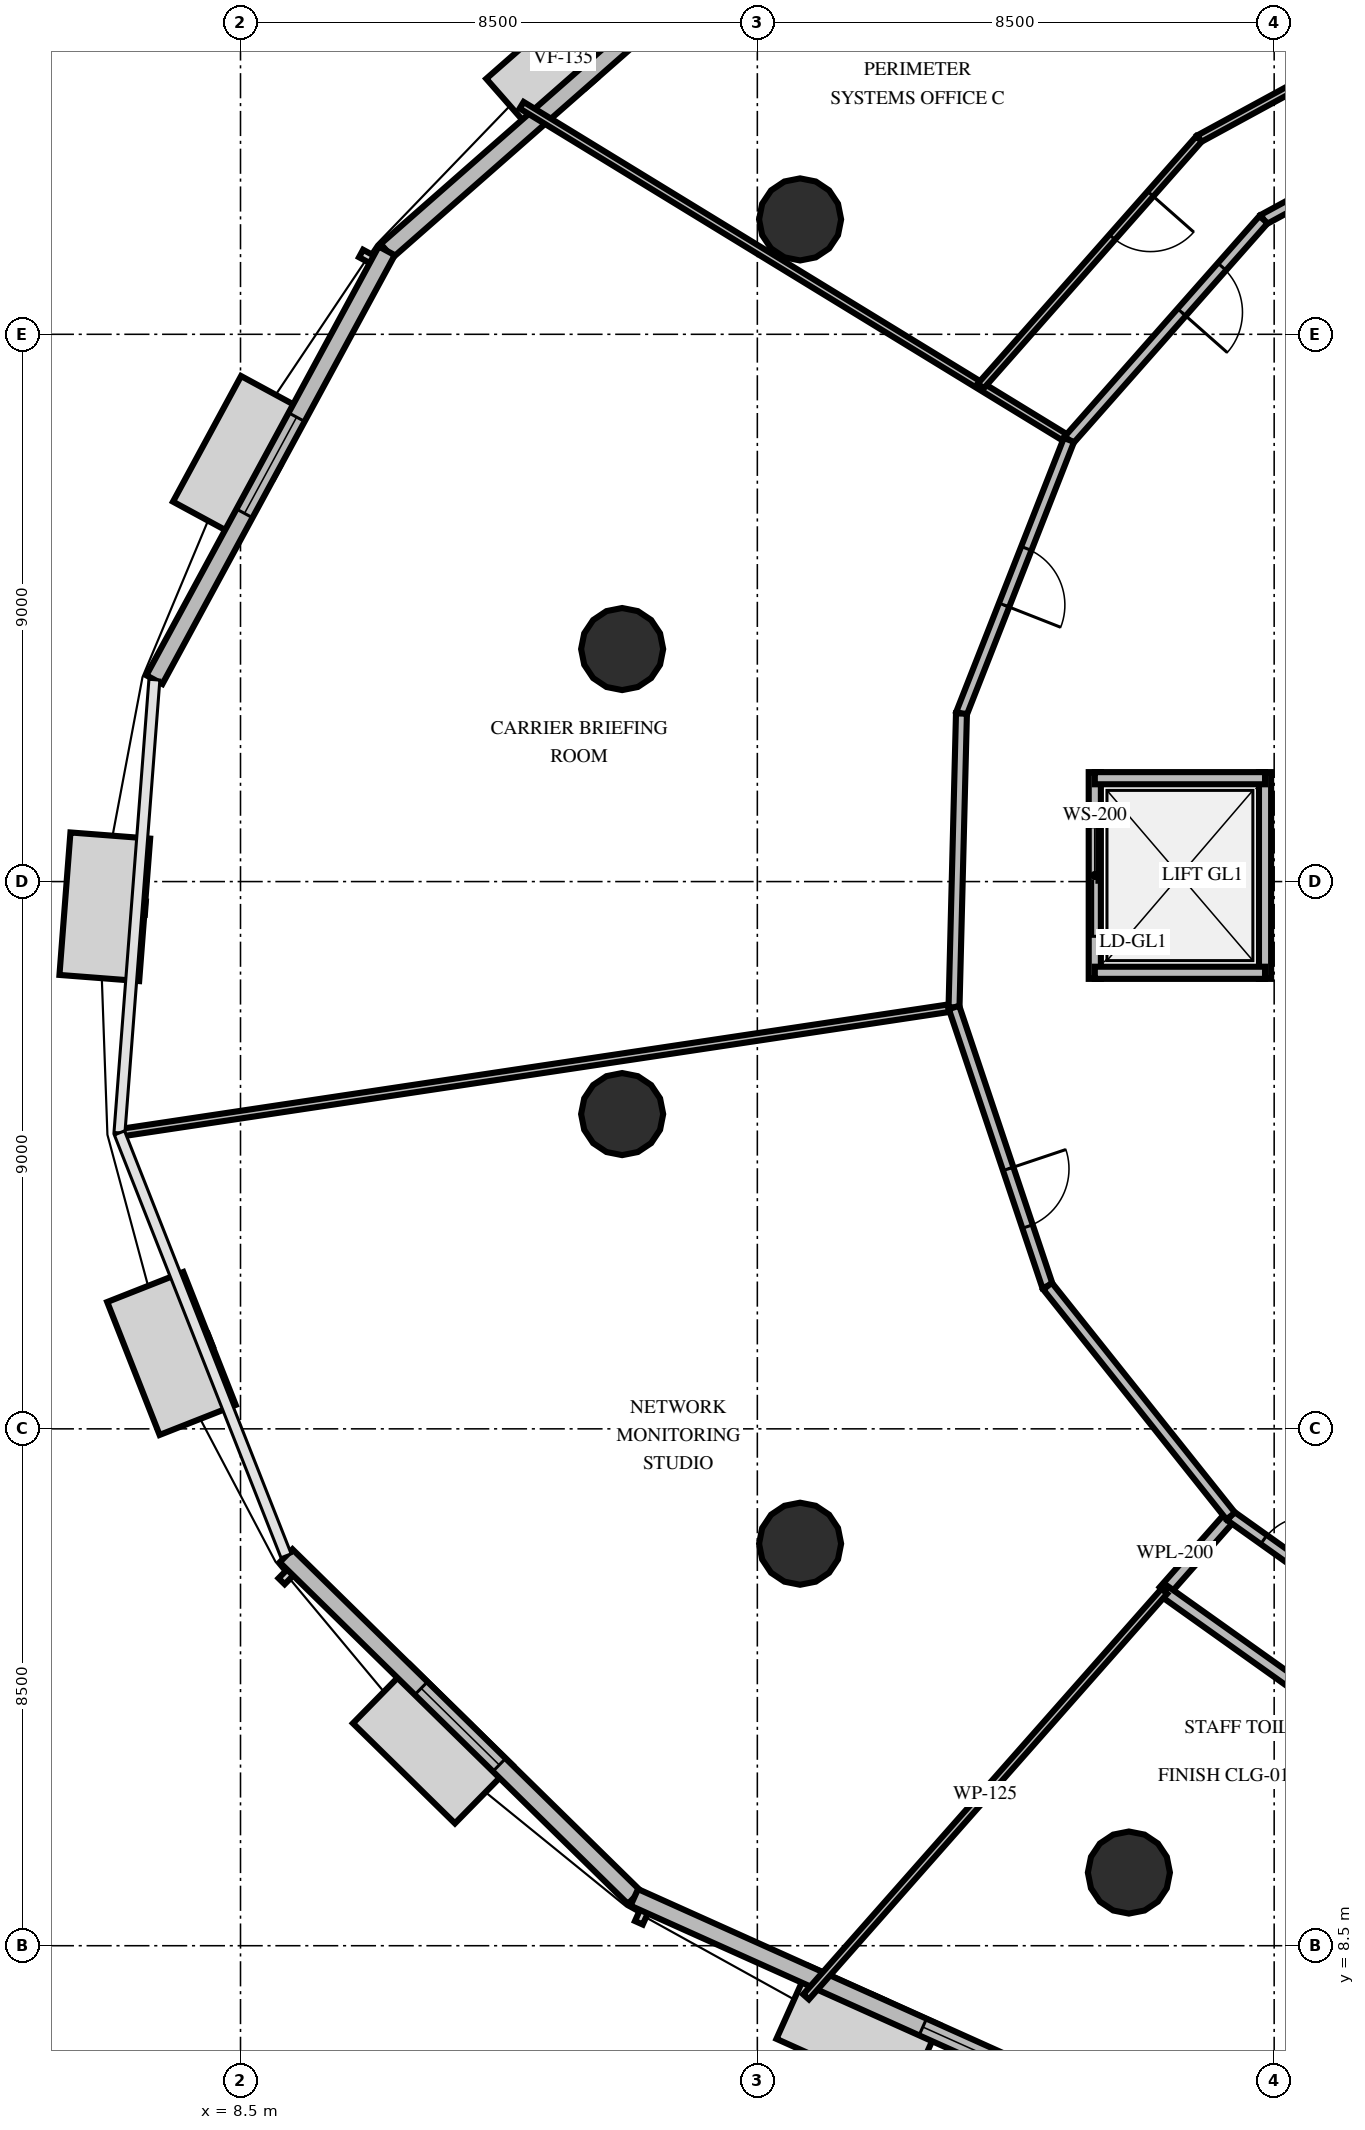
"""IFC4 building model, lengths in metres.
Left out: names, types, materials, properties, quantities, classifications, styles, units other than length and angle.
Written with IfcOpenShell. Run it as: python <this file> out.ifc"""

import sys

from ifc_helpers import new_model, si_unit, direction, frame, frame_2d, origin, origin_2d, place, context, subcontext, project, spatial, rectangle, circle, extrude, element, fill, save


model = new_model("IFC4")
c1 = context("Model", 3, precision=1e-05, world=origin(), true_north=direction((0.0, 1.0)))
c2 = subcontext(c1, "Body", "Model", "MODEL_VIEW")
j1 = project(units=[si_unit("LENGTHUNIT", "METRE"), si_unit("PLANEANGLEUNIT", "RADIAN")], contexts=[c1])
p1 = place(None, origin())
s1 = spatial("IfcSite", under=j1, at=p1, CompositionType="ELEMENT")
p2 = place(p1, origin())
s2 = spatial("IfcBuilding", under=s1, at=p2, CompositionType="ELEMENT")
p3 = place(p2, frame((0.0, 0.0, 67.8)))
s3 = spatial("IfcBuildingStorey", under=s2, at=p3, CompositionType="ELEMENT", Elevation=67.8)
for number, where, z_axis, x_axis in (
    (1, (17.703, 36.889, 0.0), (0.0, 0.0, 1.0), (1.0, 0.0, 0.0)),
    (2, (14.777, 29.824, 0.0), (0.0, 0.0, 1.0), (1.0, 0.0, 0.0)),
    (3, (14.777, 22.176, 0.0), (0.0, 0.0, 1.0), (1.0, 0.0, 0.0)),
    (4, (17.703, 15.111, 0.0), (0.0, 0.0, 1.0), (1.0, 0.0, 0.0)),
    (5, (23.111, 9.703, 0.0), (0.0, 0.0, 1.0), (1.0, 0.0, 0.0)),
):
    element("IfcColumn", number, at=place(p3, frame(where, z_axis=z_axis, x_axis=x_axis)), inside=s3, PredefinedType="COLUMN", context=c2, shape_type="SweptSolid", body=[
        extrude(circle(Radius=0.675, at=origin_2d()), origin(), (0.0, 0.0, 1.0), 4.2),
    ])
p4 = place(p3, frame((17.512, 42.175, 0.0), z_axis=(0.0, 0.0, 1.0), x_axis=(-0.751409333496, -0.659836353603, 0.0)))
e6 = element("IfcWall", 6, at=p4, inside=s3, PredefinedType="SOLIDWALL", context=c2, shape_type="SweptSolid", body=[
    extrude(rectangle(XDim=8.793, YDim=0.3, at=frame_2d((4.396, 0.0))), origin(), (0.0, 0.0, 1.0), 3.0),
])
p5 = place(p4, frame((1.79, 0.0, 0.8)))
e7 = element("IfcOpeningElement", 7, at=p5, cuts=e6, PredefinedType="OPENING", context=c2, shape_type="SweptSolid", body=[
    extrude(rectangle(XDim=1.8, YDim=1.95, at=frame_2d((0.9, 0.975))), frame((0.0, 0.16, 0.0), z_axis=(0.0, -1.0, 0.0), x_axis=(1.0, 0.0, 0.0)), (0.0, 0.0, 1.0), 0.32),
])
p6 = place(p3, frame((10.905, 36.373, 0.0), z_axis=(0.0, 0.0, 1.0), x_axis=(-0.476385116332, -0.879236726336, 0.0)))
e8 = element("IfcWall", 8, at=p6, inside=s3, PredefinedType="SOLIDWALL", context=c2, shape_type="SweptSolid", body=[
    extrude(rectangle(XDim=8.021, YDim=0.3, at=frame_2d((4.011, 0.0))), origin(), (0.0, 0.0, 1.0), 3.0),
])
p7 = place(p6, frame((3.111, 0.0, 0.8)))
e9 = element("IfcOpeningElement", 9, at=p7, cuts=e8, PredefinedType="OPENING", context=c2, shape_type="SweptSolid", body=[
    extrude(rectangle(XDim=1.8, YDim=1.95, at=frame_2d((0.9, 0.975))), frame((0.0, 0.16, 0.0), z_axis=(0.0, -1.0, 0.0), x_axis=(1.0, 0.0, 0.0)), (0.0, 0.0, 1.0), 0.32),
])
p8 = place(p3, frame((9.25, 14.912, 0.0), z_axis=(0.0, 0.0, 1.0), x_axis=(0.713861292458, -0.70028712335, 0.0)))
e10 = element("IfcWall", 10, at=p8, inside=s3, PredefinedType="SOLIDWALL", context=c2, shape_type="SweptSolid", body=[
    extrude(rectangle(XDim=8.022, YDim=0.3, at=frame_2d((4.011, 0.0))), origin(), (0.0, 0.0, 1.0), 3.0),
])
p9 = place(p8, frame((3.111, 0.0, 0.8)))
e11 = element("IfcOpeningElement", 11, at=p9, cuts=e10, PredefinedType="OPENING", context=c2, shape_type="SweptSolid", body=[
    extrude(rectangle(XDim=1.8, YDim=1.95, at=frame_2d((0.9, 0.975))), frame((0.0, 0.16, 0.0), z_axis=(0.0, -1.0, 0.0), x_axis=(1.0, 0.0, 0.0)), (0.0, 0.0, 1.0), 0.32),
])
p10 = place(p3, frame((14.976, 9.295, 0.0), z_axis=(0.0, 0.0, 1.0), x_axis=(0.912205999873, -0.409731880376, 0.0)))
e12 = element("IfcWall", 12, at=p10, inside=s3, PredefinedType="SOLIDWALL", context=c2, shape_type="SweptSolid", body=[
    extrude(rectangle(XDim=8.792, YDim=0.3, at=frame_2d((4.396, 0.0))), origin(), (0.0, 0.0, 1.0), 3.0),
])
p11 = place(p10, frame((5.202, 0.0, 0.8)))
e13 = element("IfcOpeningElement", 13, at=p11, cuts=e12, PredefinedType="OPENING", context=c2, shape_type="SweptSolid", body=[
    extrude(rectangle(XDim=1.8, YDim=1.95, at=frame_2d((0.9, 0.975))), frame((0.0, 0.16, 0.0), z_axis=(0.0, -1.0, 0.0), x_axis=(1.0, 0.0, 0.0)), (0.0, 0.0, 1.0), 0.32),
])
p12 = place(p3, frame((22.55, 24.4, 0.0), z_axis=(0.0, 0.0, 1.0), x_axis=(0.0, 1.0, 0.0)))
e14 = element("IfcWall", 14, at=p12, inside=s3, PredefinedType="SOLIDWALL", context=c2, shape_type="SweptSolid", body=[
    extrude(rectangle(XDim=3.4, YDim=0.2, at=frame_2d((1.7, 0.0))), origin(), (0.0, 0.0, 1.0), 3.0),
])
p13 = place(p12, frame((0.7, 0.0, 0.0)))
e15 = element("IfcOpeningElement", 15, at=p13, cuts=e14, PredefinedType="OPENING", context=c2, shape_type="SweptSolid", body=[
    extrude(rectangle(XDim=1.8, YDim=2.4, at=frame_2d((0.9, 1.2))), frame((0.0, 0.11, 0.0), z_axis=(0.0, -1.0, 0.0), x_axis=(1.0, 0.0, 0.0)), (0.0, 0.0, 1.0), 0.22),
])
p14 = place(p3, frame((25.35, 24.4, 0.0), z_axis=(0.0, 0.0, 1.0), x_axis=(0.0, 1.0, 0.0)))
e16 = element("IfcWall", 16, at=p14, inside=s3, PredefinedType="SOLIDWALL", context=c2, shape_type="SweptSolid", body=[
    extrude(rectangle(XDim=3.4, YDim=0.2, at=frame_2d((1.7, 0.0))), origin(), (0.0, 0.0, 1.0), 3.0),
])
for number, where, z_axis, x_axis in (
    (17, (22.55, 24.5, 0.0), (0.0, 0.0, 1.0), (1.0, 0.0, 0.0)),
    (18, (22.55, 27.7, 0.0), (0.0, 0.0, 1.0), (1.0, 0.0, 0.0)),
):
    element("IfcWall", number, at=place(p3, frame(where, z_axis=z_axis, x_axis=x_axis)), inside=s3, PredefinedType="SOLIDWALL", context=c2, shape_type="SweptSolid", body=[
        extrude(rectangle(XDim=2.8, YDim=0.2, at=frame_2d((1.4, 0.0))), origin(), (0.0, 0.0, 1.0), 3.0),
    ])
p15 = place(p3, frame((24.785, 15.566, 0.0), z_axis=(0.0, 0.0, 1.0), x_axis=(-0.662027743921, -0.749479330121, 0.0)))
e19 = element("IfcWall", 19, at=p15, inside=s3, PredefinedType="PLUMBINGWALL", context=c2, shape_type="SweptSolid", body=[
    extrude(rectangle(XDim=1.65, YDim=0.2, at=frame_2d((0.825, 0.0))), origin(), (0.0, 0.0, 1.0), 3.0),
])
p16 = place(p3, frame((23.693, 14.33, 0.0), z_axis=(0.0, 0.0, 1.0), x_axis=(0.814614334094, -0.580003005759, 0.0)))
e20 = element("IfcWall", 20, at=p16, inside=s3, PredefinedType="PLUMBINGWALL", context=c2, shape_type="SweptSolid", body=[
    extrude(rectangle(XDim=3.255, YDim=0.2, at=frame_2d((1.627, 0.0))), origin(), (0.0, 0.0, 1.0), 3.0),
])
p17 = place(p3, frame((24.785, 15.566, 0.0), z_axis=(0.0, 0.0, 1.0), x_axis=(0.814633812016, -0.57997564804, 0.0)))
e21 = element("IfcWall", 21, at=p17, inside=s3, PredefinedType="PARTITIONING", context=c2, shape_type="SweptSolid", body=[
    extrude(rectangle(XDim=2.91, YDim=0.18, at=frame_2d((1.455, 0.0))), origin(), (0.0, 0.0, 1.0), 3.0),
])
p18 = place(p17, frame((0.669, 0.0, 0.0)))
e22 = element("IfcOpeningElement", 22, at=p18, cuts=e21, PredefinedType="OPENING", context=c2, shape_type="SweptSolid", body=[
    extrude(rectangle(XDim=0.92, YDim=2.1, at=frame_2d((0.46, 1.05))), frame((0.0, 0.1, 0.0), z_axis=(0.0, -1.0, 0.0), x_axis=(1.0, 0.0, 0.0)), (0.0, 0.0, 1.0), 0.2),
])
p19 = place(p3, frame((23.693, 14.33, 0.0), z_axis=(0.0, 0.0, 1.0), x_axis=(-0.661956342433, -0.749542394206, 0.0)))
e23 = element("IfcWall", 23, at=p19, inside=s3, PredefinedType="PARTITIONING", context=c2, shape_type="SweptSolid", body=[
    extrude(rectangle(XDim=8.9, YDim=0.125, at=frame_2d((4.45, 0.0))), origin(), (0.0, 0.0, 1.0), 3.0),
])
p20 = place(p3, frame((22.125, 33.263, 0.0), z_axis=(0.0, 0.0, 1.0), x_axis=(-0.853088436917, 0.521766345023, 0.0)))
e24 = element("IfcWall", 24, at=p20, inside=s3, PredefinedType="PARTITIONING", context=c2, shape_type="SweptSolid", body=[
    extrude(rectangle(XDim=10.551, YDim=0.125, at=frame_2d((5.275, 0.0))), origin(), (0.0, 0.0, 1.0), 3.0),
])
p21 = place(p3, frame((29.572, 39.197, 0.0), z_axis=(0.0, 0.0, 1.0), x_axis=(-0.878385338365, -0.477953133001, 0.0)))
e25 = element("IfcWall", 25, at=p21, inside=s3, PredefinedType="PARTITIONING", context=c2, shape_type="SweptSolid", body=[
    extrude(rectangle(XDim=4.834, YDim=0.18, at=frame_2d((2.417, 0.0))), origin(), (0.0, 0.0, 1.0), 3.0),
])
p22 = place(p3, frame((25.325, 36.886, 0.0), z_axis=(0.0, 0.0, 1.0), x_axis=(-0.661965641577, -0.74953418159, 0.0)))
e26 = element("IfcWall", 26, at=p22, inside=s3, PredefinedType="PARTITIONING", context=c2, shape_type="SweptSolid", body=[
    extrude(rectangle(XDim=4.834, YDim=0.18, at=frame_2d((2.417, 0.0))), origin(), (0.0, 0.0, 1.0), 3.0),
])
p23 = place(p22, frame((1.034, 0.0, 0.0)))
e27 = element("IfcOpeningElement", 27, at=p23, cuts=e26, PredefinedType="OPENING", context=c2, shape_type="SweptSolid", body=[
    extrude(rectangle(XDim=1.0, YDim=2.15, at=frame_2d((0.5, 1.075))), frame((0.0, 0.1, 0.0), z_axis=(0.0, -1.0, 0.0), x_axis=(1.0, 0.0, 0.0)), (0.0, 0.0, 1.0), 0.2),
])
p24 = place(p3, frame((29.031, 40.809, 0.0), z_axis=(0.0, 0.0, 1.0), x_axis=(-0.878390435216, -0.477943765857, 0.0)))
e28 = element("IfcWall", 28, at=p24, inside=s3, PredefinedType="PARTITIONING", context=c2, shape_type="SweptSolid", body=[
    extrude(rectangle(XDim=5.425, YDim=0.125, at=frame_2d((2.712, 0.0))), origin(), (0.0, 0.0, 1.0), 3.0),
])
p25 = place(p3, frame((24.266, 38.216, 0.0), z_axis=(0.0, 0.0, 1.0), x_axis=(-0.661983266299, -0.749518615606, 0.0)))
e29 = element("IfcWall", 29, at=p25, inside=s3, PredefinedType="PARTITIONING", context=c2, shape_type="SweptSolid", body=[
    extrude(rectangle(XDim=5.425, YDim=0.125, at=frame_2d((2.712, 0.0))), origin(), (0.0, 0.0, 1.0), 3.0),
])
p26 = place(p25, frame((1.209, 0.0, 0.0)))
e30 = element("IfcOpeningElement", 30, at=p26, cuts=e29, PredefinedType="OPENING", context=c2, shape_type="SweptSolid", body=[
    extrude(rectangle(XDim=0.95, YDim=2.15, at=frame_2d((0.475, 1.075))), frame((0.0, 0.073, 0.0), z_axis=(0.0, -1.0, 0.0), x_axis=(1.0, 0.0, 0.0)), (0.0, 0.0, 1.0), 0.145),
])
p27 = place(p3, frame((20.235, 23.93, 0.0), z_axis=(0.0, 0.0, 1.0), x_axis=(-0.988887271611, -0.148667293128, 0.0)))
e31 = element("IfcWall", 31, at=p27, inside=s3, PredefinedType="PARTITIONING", context=c2, shape_type="SweptSolid", body=[
    extrude(rectangle(XDim=13.88, YDim=0.125, at=frame_2d((6.94, 0.0))), origin(), (0.0, 0.0, 1.0), 3.0),
])
p28 = place(p3, frame((22.125, 33.263, 0.0), z_axis=(0.0, 0.0, 1.0), x_axis=(-0.365724243793, -0.930723255056, 0.0)))
e32 = element("IfcWall", 32, at=p28, inside=s3, PredefinedType="PARTITIONING", context=c2, shape_type="SweptSolid", body=[
    extrude(rectangle(XDim=4.834, YDim=0.18, at=frame_2d((2.417, 0.0))), origin(), (0.0, 0.0, 1.0), 3.0),
])
p29 = place(p28, frame((1.917, 0.0, 0.0)))
e33 = element("IfcOpeningElement", 33, at=p29, cuts=e32, PredefinedType="OPENING", context=c2, shape_type="SweptSolid", body=[
    extrude(rectangle(XDim=1.0, YDim=2.15, at=frame_2d((0.5, 1.075))), frame((0.0, 0.1, 0.0), z_axis=(0.0, -1.0, 0.0), x_axis=(1.0, 0.0, 0.0)), (0.0, 0.0, 1.0), 0.2),
])
p30 = place(p3, frame((20.357, 28.763, 0.0), z_axis=(0.0, 0.0, 1.0), x_axis=(-0.025301319276, -0.99967987038, 0.0)))
e34 = element("IfcWall", 34, at=p30, inside=s3, PredefinedType="PARTITIONING", context=c2, shape_type="SweptSolid", body=[
    extrude(rectangle(XDim=4.834, YDim=0.18, at=frame_2d((2.417, 0.0))), origin(), (0.0, 0.0, 1.0), 3.0),
])
p31 = place(p3, frame((20.235, 23.93, 0.0), z_axis=(0.0, 0.0, 1.0), x_axis=(0.31816640529, -0.948034882557, 0.0)))
e35 = element("IfcWall", 35, at=p31, inside=s3, PredefinedType="PARTITIONING", context=c2, shape_type="SweptSolid", body=[
    extrude(rectangle(XDim=4.834, YDim=0.18, at=frame_2d((2.417, 0.0))), origin(), (0.0, 0.0, 1.0), 3.0),
])
p32 = place(p31, frame((2.801, 0.0, 0.0)))
e36 = element("IfcOpeningElement", 36, at=p32, cuts=e35, PredefinedType="OPENING", context=c2, shape_type="SweptSolid", body=[
    extrude(rectangle(XDim=1.0, YDim=2.15, at=frame_2d((0.5, 1.075))), frame((0.0, 0.1, 0.0), z_axis=(0.0, -1.0, 0.0), x_axis=(1.0, 0.0, 0.0)), (0.0, 0.0, 1.0), 0.2),
])
p33 = place(p3, frame((21.773, 19.347, 0.0), z_axis=(0.0, 0.0, 1.0), x_axis=(0.623166544039, -0.782089162685, 0.0)))
e37 = element("IfcWall", 37, at=p33, inside=s3, PredefinedType="PARTITIONING", context=c2, shape_type="SweptSolid", body=[
    extrude(rectangle(XDim=4.834, YDim=0.18, at=frame_2d((2.417, 0.0))), origin(), (0.0, 0.0, 1.0), 3.0),
])
p34 = place(p7, origin())
e38 = element("IfcWindow", 38, at=p34, inside=s3, PartitioningType="SINGLE_PANEL", PredefinedType="WINDOW", context=c2, shape_type="SweptSolid", body=[
    extrude(rectangle(XDim=1.8, YDim=1.95, at=frame_2d((0.9, 0.975))), frame((0.0, 0.03, 0.0), z_axis=(0.0, -1.0, 0.0), x_axis=(1.0, 0.0, 0.0)), (0.0, 0.0, 1.0), 0.06),
])
fill(e9, e38)
p35 = place(p9, origin())
e39 = element("IfcWindow", 39, at=p35, inside=s3, PartitioningType="SINGLE_PANEL", PredefinedType="WINDOW", context=c2, shape_type="SweptSolid", body=[
    extrude(rectangle(XDim=1.8, YDim=1.95, at=frame_2d((0.9, 0.975))), frame((0.0, 0.03, 0.0), z_axis=(0.0, -1.0, 0.0), x_axis=(1.0, 0.0, 0.0)), (0.0, 0.0, 1.0), 0.06),
])
fill(e11, e39)
p36 = place(p11, origin())
e40 = element("IfcWindow", 40, at=p36, inside=s3, PartitioningType="SINGLE_PANEL", PredefinedType="WINDOW", context=c2, shape_type="SweptSolid", body=[
    extrude(rectangle(XDim=1.8, YDim=1.95, at=frame_2d((0.9, 0.975))), frame((0.0, 0.03, 0.0), z_axis=(0.0, -1.0, 0.0), x_axis=(1.0, 0.0, 0.0)), (0.0, 0.0, 1.0), 0.06),
])
fill(e13, e40)
p37 = place(p13, origin())
e41 = element("IfcDoor", 41, at=p37, inside=s3, OperationType="DOUBLE_DOOR_SLIDING", PredefinedType="USERDEFINED", context=c2, shape_type="SweptSolid", body=[
    extrude(rectangle(XDim=1.8, YDim=2.4, at=frame_2d((0.9, 1.2))), frame((0.0, 0.025, 0.0), z_axis=(0.0, -1.0, 0.0), x_axis=(1.0, 0.0, 0.0)), (0.0, 0.0, 1.0), 0.05),
])
fill(e15, e41)
p38 = place(p18, origin())
e42 = element("IfcDoor", 42, at=p38, inside=s3, OperationType="SINGLE_SWING_RIGHT", PredefinedType="DOOR", context=c2, shape_type="SweptSolid", body=[
    extrude(rectangle(XDim=0.92, YDim=2.1, at=frame_2d((0.46, 1.05))), frame((0.0, 0.025, 0.0), z_axis=(0.0, -1.0, 0.0), x_axis=(1.0, 0.0, 0.0)), (0.0, 0.0, 1.0), 0.05),
])
fill(e22, e42)
p39 = place(p23, origin())
e43 = element("IfcDoor", 43, at=p39, inside=s3, OperationType="SINGLE_SWING_RIGHT", PredefinedType="DOOR", context=c2, shape_type="SweptSolid", body=[
    extrude(rectangle(XDim=1.0, YDim=2.15, at=frame_2d((0.5, 1.075))), frame((0.0, 0.025, 0.0), z_axis=(0.0, -1.0, 0.0), x_axis=(1.0, 0.0, 0.0)), (0.0, 0.0, 1.0), 0.05),
])
fill(e27, e43)
p40 = place(p26, origin())
e44 = element("IfcDoor", 44, at=p40, inside=s3, OperationType="SINGLE_SWING_LEFT", PredefinedType="DOOR", context=c2, shape_type="SweptSolid", body=[
    extrude(rectangle(XDim=0.95, YDim=2.15, at=frame_2d((0.475, 1.075))), frame((0.0, 0.025, 0.0), z_axis=(0.0, -1.0, 0.0), x_axis=(1.0, 0.0, 0.0)), (0.0, 0.0, 1.0), 0.05),
])
fill(e30, e44)
p41 = place(p29, origin())
e45 = element("IfcDoor", 45, at=p41, inside=s3, OperationType="SINGLE_SWING_RIGHT", PredefinedType="DOOR", context=c2, shape_type="SweptSolid", body=[
    extrude(rectangle(XDim=1.0, YDim=2.15, at=frame_2d((0.5, 1.075))), frame((0.0, 0.025, 0.0), z_axis=(0.0, -1.0, 0.0), x_axis=(1.0, 0.0, 0.0)), (0.0, 0.0, 1.0), 0.05),
])
fill(e33, e45)
p42 = place(p32, origin())
e46 = element("IfcDoor", 46, at=p42, inside=s3, OperationType="SINGLE_SWING_LEFT", PredefinedType="DOOR", context=c2, shape_type="SweptSolid", body=[
    extrude(rectangle(XDim=1.0, YDim=2.15, at=frame_2d((0.5, 1.075))), frame((0.0, 0.025, 0.0), z_axis=(0.0, -1.0, 0.0), x_axis=(1.0, 0.0, 0.0)), (0.0, 0.0, 1.0), 0.05),
])
fill(e36, e46)
save(model, sys.argv[1])
